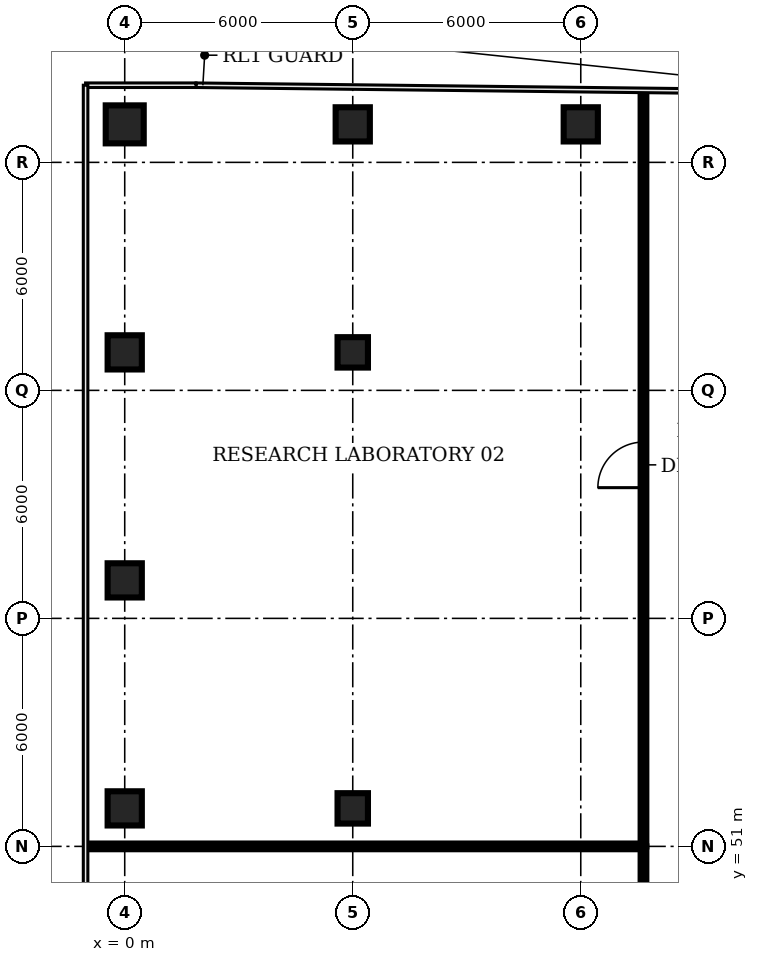
"""IFC4 building model, lengths in metres.
Left out: names, types, materials, properties, quantities, classifications, styles, units other than length and angle.
Written with IfcOpenShell. Run it as: python <this file> out.ifc"""

import sys

from ifc_helpers import new_model, si_unit, direction, frame, frame_2d, origin, origin_2d, place, context, subcontext, project, spatial, rectangle, circle, extrude, element, fill, save


model = new_model("IFC4")
c1 = context("Model", 3, precision=1e-05, world=origin(), true_north=direction((0.0, 1.0)))
c2 = subcontext(c1, "Body", "Model", "MODEL_VIEW")
j1 = project(units=[si_unit("LENGTHUNIT", "METRE"), si_unit("PLANEANGLEUNIT", "RADIAN")], contexts=[c1])
p1 = place(None, origin())
s1 = spatial("IfcSite", under=j1, at=p1, CompositionType="ELEMENT")
p2 = place(p1, origin())
s2 = spatial("IfcBuilding", under=s1, at=p2, CompositionType="ELEMENT")
p3 = place(p2, frame((0.0, 0.0, 129.8)))
s3 = spatial("IfcBuildingStorey", under=s2, at=p3, CompositionType="ELEMENT", Elevation=129.8)
for number, where, z_axis, x_axis in (
    (1, (0.0, 52.0, 0.0), (0.0, 0.0, 1.0), (1.0, 0.0, 0.0)),
    (2, (0.0, 58.0, 0.0), (0.0, 0.0, 1.0), (1.0, 0.0, 0.0)),
    (3, (0.0, 64.0, 0.0), (0.0, 0.0, 1.0), (1.0, 0.0, 0.0)),
):
    element("IfcColumn", number, at=place(p3, frame(where, z_axis=z_axis, x_axis=x_axis)), inside=s3, PredefinedType="COLUMN", context=c2, shape_type="SweptSolid", body=[
        extrude(rectangle(XDim=0.9, YDim=0.9, at=origin_2d()), origin(), (0.0, 0.0, 1.0), 3.85),
    ])
p4 = place(p3, frame((0.0, 70.0, 0.0), z_axis=(0.0, 0.0, 1.0), x_axis=(1.0, 0.0, 0.0)))
e4 = element("IfcColumn", 4, at=p4, inside=s3, PredefinedType="COLUMN", context=c2, shape_type="SweptSolid", body=[
    extrude(circle(Radius=0.5, at=origin_2d()), origin(), (0.0, 0.0, 1.0), 3.85),
])
for number, where, z_axis, x_axis in (
    (5, (6.0, 52.0, 0.0), (0.0, 0.0, 1.0), (1.0, 0.0, 0.0)),
    (6, (6.0, 64.0, 0.0), (0.0, 0.0, 1.0), (1.0, 0.0, 0.0)),
):
    element("IfcColumn", number, at=place(p3, frame(where, z_axis=z_axis, x_axis=x_axis)), inside=s3, PredefinedType="COLUMN", context=c2, shape_type="SweptSolid", body=[
        extrude(rectangle(XDim=0.8, YDim=0.8, at=origin_2d()), origin(), (0.0, 0.0, 1.0), 3.85),
    ])
for number, where, z_axis, x_axis in (
    (7, (6.0, 70.0, 0.0), (0.0, 0.0, 1.0), (1.0, 0.0, 0.0)),
    (8, (12.0, 70.0, 0.0), (0.0, 0.0, 1.0), (1.0, 0.0, 0.0)),
):
    element("IfcColumn", number, at=place(p3, frame(where, z_axis=z_axis, x_axis=x_axis)), inside=s3, PredefinedType="COLUMN", context=c2, shape_type="SweptSolid", body=[
        extrude(rectangle(XDim=0.9, YDim=0.9, at=origin_2d()), origin(), (0.0, 0.0, 1.0), 3.85),
    ])
p5 = place(p3, frame((-0.98, 51.0, 0.0), z_axis=(0.0, 0.0, 1.0), x_axis=(1.0, 0.0, 0.0)))
e9 = element("IfcWall", 9, at=p5, inside=s3, PredefinedType="PARTITIONING", context=c2, shape_type="SweptSolid", body=[
    extrude(rectangle(XDim=14.63, YDim=0.15, at=frame_2d((7.315, 0.0))), origin(), (0.0, 0.0, 1.0), 2.83),
])
p6 = place(p3, frame((13.65, 45.0, 0.0), z_axis=(0.0, 0.0, 1.0), x_axis=(0.0, 1.0, 0.0)))
e10 = element("IfcWall", 10, at=p6, inside=s3, PredefinedType="PARTITIONING", context=c2, shape_type="SweptSolid", body=[
    extrude(rectangle(XDim=6.0, YDim=0.15, at=frame_2d((3.0, 0.0))), origin(), (0.0, 0.0, 1.0), 2.83),
])
p7 = place(p6, frame((2.4, 0.0, 0.0)))
e11 = element("IfcOpeningElement", 11, at=p7, cuts=e10, PredefinedType="OPENING", context=c2, shape_type="SweptSolid", body=[
    extrude(rectangle(XDim=1.0, YDim=2.1, at=frame_2d((0.5, 1.05))), frame((0.0, 0.085, 0.0), z_axis=(0.0, -1.0, 0.0), x_axis=(1.0, 0.0, 0.0)), (0.0, 0.0, 1.0), 0.17),
])
p8 = place(p3, frame((13.65, 51.0, 0.0), z_axis=(0.0, 0.0, 1.0), x_axis=(0.0, 1.0, 0.0)))
e12 = element("IfcWall", 12, at=p8, inside=s3, PredefinedType="PARTITIONING", context=c2, shape_type="SweptSolid", body=[
    extrude(rectangle(XDim=19.84, YDim=0.15, at=frame_2d((9.92, 0.0))), origin(), (0.0, 0.0, 1.0), 2.83),
])
p9 = place(p8, frame((9.44, 0.0, 0.0)))
e13 = element("IfcOpeningElement", 13, at=p9, cuts=e12, PredefinedType="OPENING", context=c2, shape_type="SweptSolid", body=[
    extrude(rectangle(XDim=1.2, YDim=2.1, at=frame_2d((0.6, 1.05))), frame((0.0, 0.085, 0.0), z_axis=(0.0, -1.0, 0.0), x_axis=(1.0, 0.0, 0.0)), (0.0, 0.0, 1.0), 0.17),
])
p10 = place(p9, origin())
e14 = element("IfcDoor", 14, at=p10, inside=s3, OperationType="SINGLE_SWING_LEFT", PredefinedType="DOOR", context=c2, shape_type="SweptSolid", body=[
    extrude(rectangle(XDim=1.2, YDim=2.1, at=frame_2d((0.6, 1.05))), frame((0.0, 0.025, 0.0), z_axis=(0.0, -1.0, 0.0), x_axis=(1.0, 0.0, 0.0)), (0.0, 0.0, 1.0), 0.05),
])
fill(e13, e14)
save(model, sys.argv[1])
